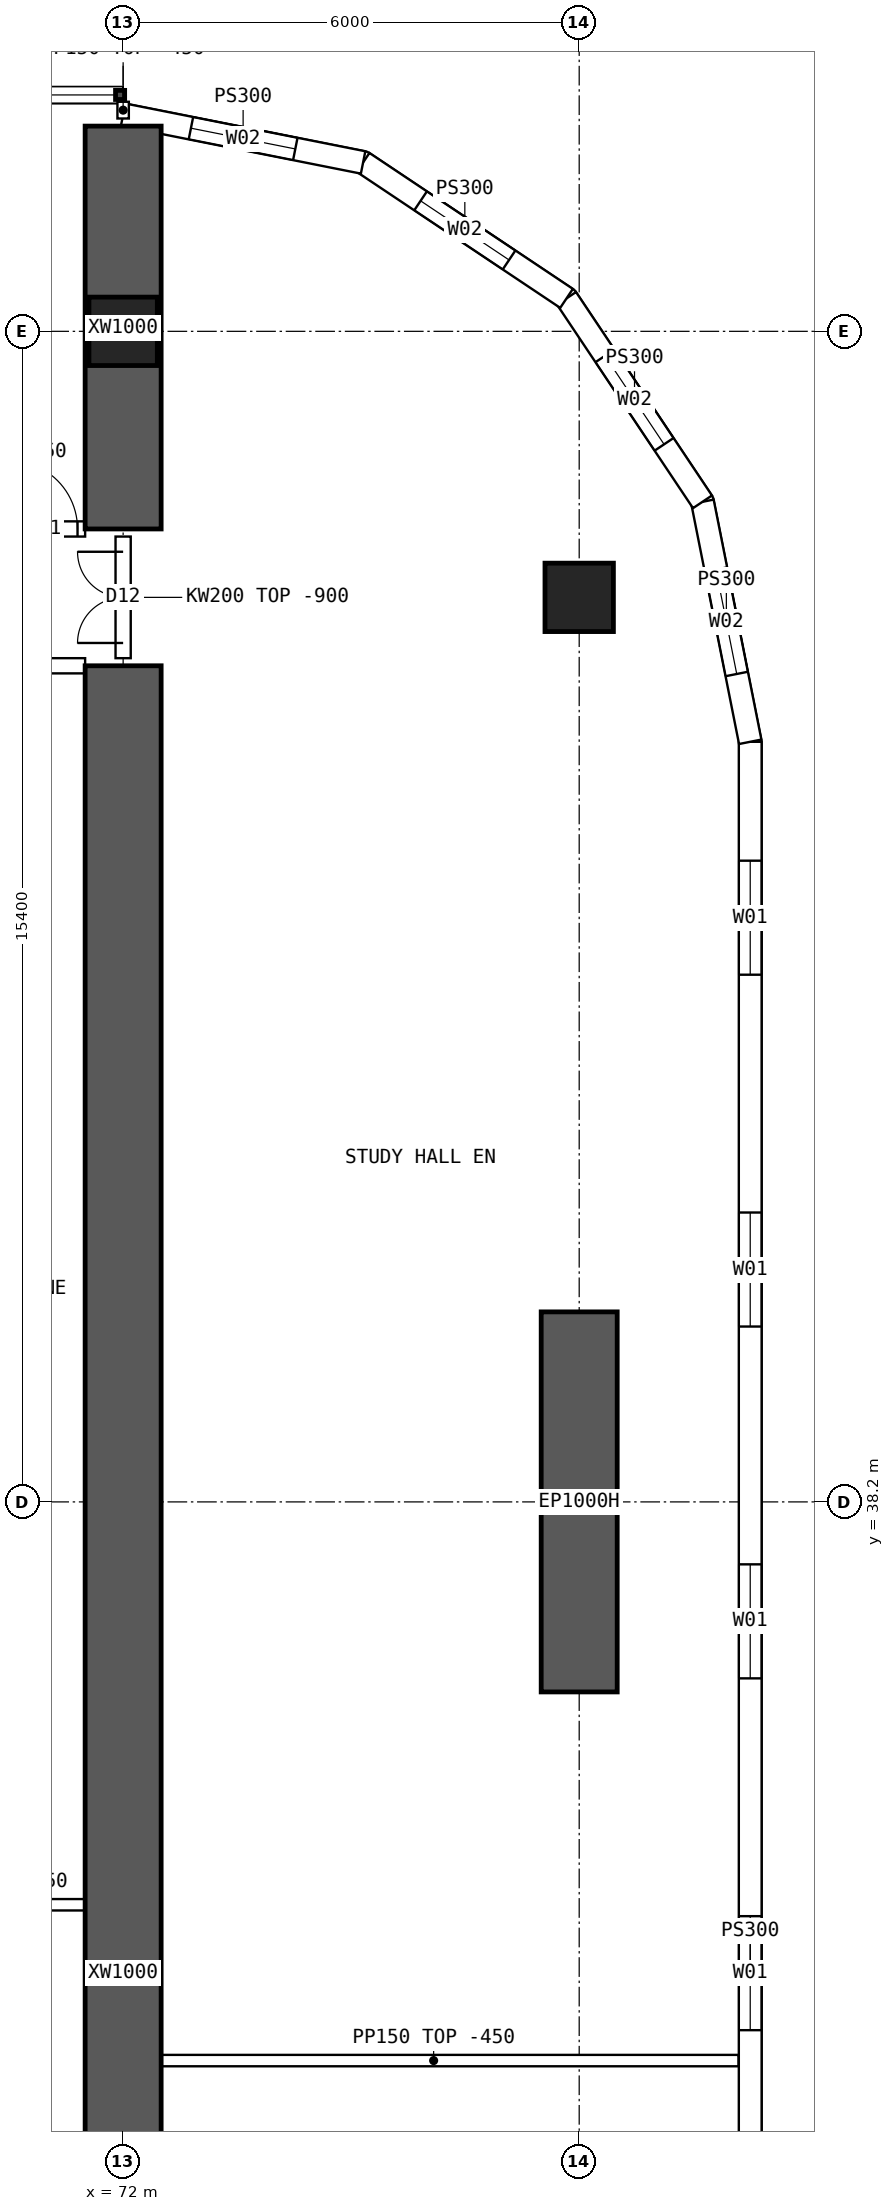
"""IFC4 building model, lengths in metres.
Left out: names, types, materials, properties, quantities, classifications, styles, units other than length and angle.
Written with IfcOpenShell. Run it as: python <this file> out.ifc"""

import sys

from ifc_helpers import new_model, si_unit, direction, frame, frame_2d, origin, origin_2d, place, context, subcontext, project, spatial, polyline, rectangle, hollow_rectangle, outline, extrude, element, fill, save


model = new_model("IFC4")
c1 = context("Model", 3, precision=1e-05, world=origin(), true_north=direction((0.0, 1.0)))
c2 = subcontext(c1, "Body", "Model", "MODEL_VIEW")
j1 = project(units=[si_unit("LENGTHUNIT", "METRE"), si_unit("PLANEANGLEUNIT", "RADIAN")], contexts=[c1])
p1 = place(None, origin())
s1 = spatial("IfcSite", under=j1, at=p1, CompositionType="ELEMENT")
p2 = place(p1, origin())
s2 = spatial("IfcBuilding", under=s1, at=p2, CompositionType="ELEMENT")
p3 = place(p2, frame((0.0, 0.0, 35.2)))
s3 = spatial("IfcBuildingStorey", under=s2, at=p3, CompositionType="ELEMENT", Elevation=35.2)
for number, where, z_axis, x_axis in (
    (1, (72.0, 53.6, 0.0), (0.0, 0.0, 1.0), (1.0, 0.0, 0.0)),
    (2, (78.0, 50.1, 0.0), (0.0, 0.0, 1.0), (1.0, 0.0, 0.0)),
):
    element("IfcColumn", number, at=place(p3, frame(where, z_axis=z_axis, x_axis=x_axis)), inside=s3, PredefinedType="COLUMN", context=c2, shape_type="SweptSolid", body=[
        extrude(hollow_rectangle(XDim=0.9, YDim=0.9, WallThickness=0.09, at=origin_2d()), origin(), (0.0, 0.0, 1.0), 3.75),
    ])
p4 = place(p3, frame((78.0, 35.7, 0.0), z_axis=(0.0, 0.0, 1.0), x_axis=(0.0, 1.0, 0.0)))
e3 = element("IfcWall", 3, at=p4, inside=s3, PredefinedType="SHEAR", context=c2, shape_type="SweptSolid", body=[
    extrude(rectangle(XDim=5.0, YDim=1.0, at=frame_2d((2.5, 0.0))), origin(), (0.0, 0.0, 1.0), 3.75),
])
p5 = place(p3, frame((72.0, 51.0, 0.0), z_axis=(0.0, 0.0, 1.0), x_axis=(0.0, 1.0, 0.0)))
e4 = element("IfcWall", 4, at=p5, inside=s3, PredefinedType="SHEAR", context=c2, shape_type="SweptSolid", body=[
    extrude(rectangle(XDim=5.3, YDim=1.0, at=frame_2d((2.65, 0.0))), origin(), (0.0, 0.0, 1.0), 3.75),
])
p6 = place(p3, frame((72.0, 14.8, 0.0), z_axis=(0.0, 0.0, 1.0), x_axis=(0.0, 1.0, 0.0)))
e5 = element("IfcWall", 5, at=p6, inside=s3, PredefinedType="SHEAR", context=c2, shape_type="SweptSolid", body=[
    extrude(rectangle(XDim=34.4, YDim=1.0, at=frame_2d((17.2, 0.0))), origin(), (0.0, 0.0, 1.0), 3.75),
])
p7 = place(p3, frame((80.25, 15.8, 0.0), z_axis=(0.0, 0.0, 1.0), x_axis=(0.0, 1.0, 0.0)))
e6 = element("IfcWall", 6, at=p7, inside=s3, PredefinedType="SOLIDWALL", context=c2, shape_type="SweptSolid", body=[
    extrude(outline(polyline([(-0.015, -0.15), (32.415, -0.15), (32.385, 0.15), (0.015, 0.15), (-0.015, -0.15)])), origin(), (0.0, 0.0, 1.0), 3.3),
])
p8 = place(p7, frame((1.564, 0.0, 0.9)))
e7 = element("IfcOpeningElement", 7, at=p8, cuts=e6, PredefinedType="OPENING", context=c2, shape_type="SweptSolid", body=[
    extrude(rectangle(XDim=1.5, YDim=2.0, at=frame_2d((0.75, 1.0))), frame((0.0, 0.16, 0.0), z_axis=(0.0, -1.0, 0.0), x_axis=(1.0, 0.0, 0.0)), (0.0, 0.0, 1.0), 0.32),
])
p9 = place(p7, frame((6.193, 0.0, 0.9)))
e8 = element("IfcOpeningElement", 8, at=p9, cuts=e6, PredefinedType="OPENING", context=c2, shape_type="SweptSolid", body=[
    extrude(rectangle(XDim=1.5, YDim=2.0, at=frame_2d((0.75, 1.0))), frame((0.0, 0.16, 0.0), z_axis=(0.0, -1.0, 0.0), x_axis=(1.0, 0.0, 0.0)), (0.0, 0.0, 1.0), 0.32),
])
p10 = place(p7, frame((10.822, 0.0, 0.9)))
e9 = element("IfcOpeningElement", 9, at=p10, cuts=e6, PredefinedType="OPENING", context=c2, shape_type="SweptSolid", body=[
    extrude(rectangle(XDim=1.5, YDim=2.0, at=frame_2d((0.75, 1.0))), frame((0.0, 0.16, 0.0), z_axis=(0.0, -1.0, 0.0), x_axis=(1.0, 0.0, 0.0)), (0.0, 0.0, 1.0), 0.32),
])
p11 = place(p7, frame((15.45, 0.0, 0.9)))
e10 = element("IfcOpeningElement", 10, at=p11, cuts=e6, PredefinedType="OPENING", context=c2, shape_type="SweptSolid", body=[
    extrude(rectangle(XDim=1.5, YDim=2.0, at=frame_2d((0.75, 1.0))), frame((0.0, 0.16, 0.0), z_axis=(0.0, -1.0, 0.0), x_axis=(1.0, 0.0, 0.0)), (0.0, 0.0, 1.0), 0.32),
])
p12 = place(p7, frame((20.079, 0.0, 0.9)))
e11 = element("IfcOpeningElement", 11, at=p12, cuts=e6, PredefinedType="OPENING", context=c2, shape_type="SweptSolid", body=[
    extrude(rectangle(XDim=1.5, YDim=2.0, at=frame_2d((0.75, 1.0))), frame((0.0, 0.16, 0.0), z_axis=(0.0, -1.0, 0.0), x_axis=(1.0, 0.0, 0.0)), (0.0, 0.0, 1.0), 0.32),
])
p13 = place(p7, frame((24.707, 0.0, 0.9)))
e12 = element("IfcOpeningElement", 12, at=p13, cuts=e6, PredefinedType="OPENING", context=c2, shape_type="SweptSolid", body=[
    extrude(rectangle(XDim=1.5, YDim=2.0, at=frame_2d((0.75, 1.0))), frame((0.0, 0.16, 0.0), z_axis=(0.0, -1.0, 0.0), x_axis=(1.0, 0.0, 0.0)), (0.0, 0.0, 1.0), 0.32),
])
p14 = place(p7, frame((29.336, 0.0, 0.9)))
e13 = element("IfcOpeningElement", 13, at=p14, cuts=e6, PredefinedType="OPENING", context=c2, shape_type="SweptSolid", body=[
    extrude(rectangle(XDim=1.5, YDim=2.0, at=frame_2d((0.75, 1.0))), frame((0.0, 0.16, 0.0), z_axis=(0.0, -1.0, 0.0), x_axis=(1.0, 0.0, 0.0)), (0.0, 0.0, 1.0), 0.32),
])
p15 = place(p3, frame((80.25, 48.2, 0.0), z_axis=(0.0, 0.0, 1.0), x_axis=(-0.195065901187, 0.980790137692, 0.0)))
e14 = element("IfcWall", 14, at=p15, inside=s3, PredefinedType="SOLIDWALL", context=c2, shape_type="SweptSolid", body=[
    extrude(outline(polyline([(-0.015, -0.15), (3.249, -0.15), (3.189, 0.15), (0.015, 0.15), (-0.015, -0.15)])), origin(), (0.0, 0.0, 1.0), 3.3),
])
p16 = place(p15, frame((0.909, 0.0, 0.9)))
e15 = element("IfcOpeningElement", 15, at=p16, cuts=e14, PredefinedType="OPENING", context=c2, shape_type="SweptSolid", body=[
    extrude(rectangle(XDim=1.4, YDim=1.8, at=frame_2d((0.7, 0.9))), frame((0.0, 0.16, 0.0), z_axis=(0.0, -1.0, 0.0), x_axis=(1.0, 0.0, 0.0)), (0.0, 0.0, 1.0), 0.32),
])
p17 = place(p3, frame((79.622, 51.357, 0.0), z_axis=(0.0, 0.0, 1.0), x_axis=(-0.555609954424, 0.831443069936, 0.0)))
e16 = element("IfcWall", 16, at=p17, inside=s3, PredefinedType="SOLIDWALL", context=c2, shape_type="SweptSolid", body=[
    extrude(outline(polyline([(-0.03, -0.15), (3.249, -0.15), (3.189, 0.15), (0.03, 0.15), (-0.03, -0.15)])), origin(), (0.0, 0.0, 1.0), 3.3),
])
p18 = place(p17, frame((0.909, 0.0, 0.9)))
e17 = element("IfcOpeningElement", 17, at=p18, cuts=e16, PredefinedType="OPENING", context=c2, shape_type="SweptSolid", body=[
    extrude(rectangle(XDim=1.4, YDim=1.8, at=frame_2d((0.7, 0.9))), frame((0.0, 0.16, 0.0), z_axis=(0.0, -1.0, 0.0), x_axis=(1.0, 0.0, 0.0)), (0.0, 0.0, 1.0), 0.32),
])
p19 = place(p3, frame((77.833, 54.034, 0.0), z_axis=(0.0, 0.0, 1.0), x_axis=(-0.831478105043, 0.555557522525, 0.0)))
e18 = element("IfcWall", 18, at=p19, inside=s3, PredefinedType="SOLIDWALL", context=c2, shape_type="SweptSolid", body=[
    extrude(outline(polyline([(-0.03, -0.15), (3.249, -0.15), (3.189, 0.15), (0.03, 0.15), (-0.03, -0.15)])), origin(), (0.0, 0.0, 1.0), 3.3),
])
p20 = place(p19, frame((0.909, 0.0, 0.9)))
e19 = element("IfcOpeningElement", 19, at=p20, cuts=e18, PredefinedType="OPENING", context=c2, shape_type="SweptSolid", body=[
    extrude(rectangle(XDim=1.4, YDim=1.8, at=frame_2d((0.7, 0.9))), frame((0.0, 0.16, 0.0), z_axis=(0.0, -1.0, 0.0), x_axis=(1.0, 0.0, 0.0)), (0.0, 0.0, 1.0), 0.32),
])
p21 = place(p3, frame((75.157, 55.822, 0.0), z_axis=(0.0, 0.0, 1.0), x_axis=(-0.980787251524, 0.195080412259, 0.0)))
e20 = element("IfcWall", 20, at=p21, inside=s3, PredefinedType="SOLIDWALL", context=c2, shape_type="SweptSolid", body=[
    extrude(outline(polyline([(-0.03, -0.15), (3.249, -0.15), (3.189, 0.15), (0.03, 0.15), (-0.03, -0.15)])), origin(), (0.0, 0.0, 1.0), 3.3),
])
p22 = place(p21, frame((0.909, 0.0, 0.9)))
e21 = element("IfcOpeningElement", 21, at=p22, cuts=e20, PredefinedType="OPENING", context=c2, shape_type="SweptSolid", body=[
    extrude(rectangle(XDim=1.4, YDim=1.8, at=frame_2d((0.7, 0.9))), frame((0.0, 0.16, 0.0), z_axis=(0.0, -1.0, 0.0), x_axis=(1.0, 0.0, 0.0)), (0.0, 0.0, 1.0), 0.32),
])
p23 = place(p3, frame((66.5, 51.0, 0.0), z_axis=(0.0, 0.0, 1.0), x_axis=(1.0, 0.0, 0.0)))
e22 = element("IfcWall", 22, at=p23, inside=s3, PredefinedType="SOLIDWALL", context=c2, shape_type="SweptSolid", body=[
    extrude(outline(polyline([(0.0, 0.0), (5.0, 0.0), (5.0, 2.9), (0.0, 2.9), (0.0, 0.0)])), frame((0.0, 0.1, 0.0), z_axis=(0.0, -1.0, 0.0), x_axis=(1.0, 0.0, 0.0)), (0.0, 0.0, 1.0), 0.2),
])
p24 = place(p23, frame((0.1, 0.0, 0.0)))
e23 = element("IfcOpeningElement", 23, at=p24, cuts=e22, PredefinedType="OPENING", context=c2, shape_type="SweptSolid", body=[
    extrude(rectangle(XDim=0.9, YDim=2.1, at=frame_2d((0.45, 1.05))), frame((0.0, 0.11, 0.0), z_axis=(0.0, -1.0, 0.0), x_axis=(1.0, 0.0, 0.0)), (0.0, 0.0, 1.0), 0.22),
])
p25 = place(p23, frame((4.0, 0.0, 0.0)))
e24 = element("IfcOpeningElement", 24, at=p25, cuts=e22, PredefinedType="OPENING", context=c2, shape_type="SweptSolid", body=[
    extrude(rectangle(XDim=0.9, YDim=2.1, at=frame_2d((0.45, 1.05))), frame((0.0, 0.11, 0.0), z_axis=(0.0, -1.0, 0.0), x_axis=(1.0, 0.0, 0.0)), (0.0, 0.0, 1.0), 0.22),
])
p26 = place(p3, frame((66.5, 49.2, 0.0), z_axis=(0.0, 0.0, 1.0), x_axis=(1.0, 0.0, 0.0)))
e25 = element("IfcWall", 25, at=p26, inside=s3, PredefinedType="SOLIDWALL", context=c2, shape_type="SweptSolid", body=[
    extrude(rectangle(XDim=5.0, YDim=0.2, at=frame_2d((2.5, 0.0))), origin(), (0.0, 0.0, 1.0), 3.3),
])
p27 = place(p26, frame((0.2, 0.0, 0.0)))
e26 = element("IfcOpeningElement", 26, at=p27, cuts=e25, PredefinedType="OPENING", context=c2, shape_type="SweptSolid", body=[
    extrude(rectangle(XDim=1.6, YDim=2.1, at=frame_2d((0.8, 1.05))), frame((0.0, 0.11, 0.0), z_axis=(0.0, -1.0, 0.0), x_axis=(1.0, 0.0, 0.0)), (0.0, 0.0, 1.0), 0.22),
])
p28 = place(p3, frame((68.4, 32.9, 0.0), z_axis=(0.0, 0.0, 1.0), x_axis=(1.0, 0.0, 0.0)))
e27 = element("IfcWall", 27, at=p28, inside=s3, PredefinedType="PARTITIONING", context=c2, shape_type="SweptSolid", body=[
    extrude(rectangle(XDim=3.6, YDim=0.15, at=frame_2d((1.8, 0.0))), origin(), (0.0, 0.0, 1.0), 3.3),
])
p29 = place(p3, frame((72.075, 30.85, 0.0), z_axis=(0.0, 0.0, 1.0), x_axis=(1.0, 0.0, 0.0)))
e28 = element("IfcWall", 28, at=p29, inside=s3, PredefinedType="PARTITIONING", context=c2, shape_type="SweptSolid", body=[
    extrude(outline(polyline([(0.0, 0.0), (8.02, 0.0), (8.02, 3.3), (6.227, 3.3), (6.225, 2.85), (5.627, 2.85), (5.625, 3.3), (0.0, 3.3), (0.0, 0.0)])), frame((0.0, 0.075, 0.0), z_axis=(0.0, -1.0, 0.0), x_axis=(1.0, 0.0, 0.0)), (0.0, 0.0, 1.0), 0.15),
])
p30 = place(p3, frame((72.0, 49.3, 0.0), z_axis=(0.0, 0.0, 1.0), x_axis=(0.0, 1.0, 0.0)))
e29 = element("IfcWall", 29, at=p30, inside=s3, PredefinedType="SOLIDWALL", context=c2, shape_type="SweptSolid", body=[
    extrude(outline(polyline([(0.0, 0.0), (1.6, 0.0), (1.6, 2.85), (0.0, 2.85), (0.0, 0.0)])), frame((0.0, 0.1, 0.0), z_axis=(0.0, -1.0, 0.0), x_axis=(1.0, 0.0, 0.0)), (0.0, 0.0, 1.0), 0.2),
])
p31 = place(p30, frame((0.2, 0.0, 0.0)))
e30 = element("IfcOpeningElement", 30, at=p31, cuts=e29, PredefinedType="OPENING", context=c2, shape_type="SweptSolid", body=[
    extrude(rectangle(XDim=1.2, YDim=2.1, at=frame_2d((0.6, 1.05))), frame((0.0, 0.11, 0.0), z_axis=(0.0, -1.0, 0.0), x_axis=(1.0, 0.0, 0.0)), (0.0, 0.0, 1.0), 0.22),
])
p32 = place(p3, frame((72.0, 56.4, 0.0), z_axis=(0.0, 0.0, 1.0), x_axis=(0.0, 1.0, 0.0)))
e31 = element("IfcWall", 31, at=p32, inside=s3, PredefinedType="PARTITIONING", context=c2, shape_type="SweptSolid", body=[
    extrude(rectangle(XDim=0.22, YDim=0.15, at=frame_2d((0.11, 0.0))), origin(), (0.0, 0.0, 1.0), 3.3),
])
p33 = place(p11, origin())
e32 = element("IfcWindow", 32, at=p33, inside=s3, PartitioningType="SINGLE_PANEL", PredefinedType="WINDOW", context=c2, shape_type="SweptSolid", body=[
    extrude(rectangle(XDim=1.5, YDim=2.0, at=frame_2d((0.75, 1.0))), frame((0.0, 0.03, 0.0), z_axis=(0.0, -1.0, 0.0), x_axis=(1.0, 0.0, 0.0)), (0.0, 0.0, 1.0), 0.06),
])
fill(e10, e32)
p34 = place(p12, origin())
e33 = element("IfcWindow", 33, at=p34, inside=s3, PartitioningType="SINGLE_PANEL", PredefinedType="WINDOW", context=c2, shape_type="SweptSolid", body=[
    extrude(rectangle(XDim=1.5, YDim=2.0, at=frame_2d((0.75, 1.0))), frame((0.0, 0.03, 0.0), z_axis=(0.0, -1.0, 0.0), x_axis=(1.0, 0.0, 0.0)), (0.0, 0.0, 1.0), 0.06),
])
fill(e11, e33)
p35 = place(p13, origin())
e34 = element("IfcWindow", 34, at=p35, inside=s3, PartitioningType="SINGLE_PANEL", PredefinedType="WINDOW", context=c2, shape_type="SweptSolid", body=[
    extrude(rectangle(XDim=1.5, YDim=2.0, at=frame_2d((0.75, 1.0))), frame((0.0, 0.03, 0.0), z_axis=(0.0, -1.0, 0.0), x_axis=(1.0, 0.0, 0.0)), (0.0, 0.0, 1.0), 0.06),
])
fill(e12, e34)
p36 = place(p14, origin())
e35 = element("IfcWindow", 35, at=p36, inside=s3, PartitioningType="SINGLE_PANEL", PredefinedType="WINDOW", context=c2, shape_type="SweptSolid", body=[
    extrude(rectangle(XDim=1.5, YDim=2.0, at=frame_2d((0.75, 1.0))), frame((0.0, 0.03, 0.0), z_axis=(0.0, -1.0, 0.0), x_axis=(1.0, 0.0, 0.0)), (0.0, 0.0, 1.0), 0.06),
])
fill(e13, e35)
p37 = place(p16, origin())
e36 = element("IfcWindow", 36, at=p37, inside=s3, PartitioningType="SINGLE_PANEL", PredefinedType="WINDOW", context=c2, shape_type="SweptSolid", body=[
    extrude(rectangle(XDim=1.4, YDim=1.8, at=frame_2d((0.7, 0.9))), frame((0.0, 0.03, 0.0), z_axis=(0.0, -1.0, 0.0), x_axis=(1.0, 0.0, 0.0)), (0.0, 0.0, 1.0), 0.06),
])
fill(e15, e36)
p38 = place(p18, origin())
e37 = element("IfcWindow", 37, at=p38, inside=s3, PartitioningType="SINGLE_PANEL", PredefinedType="WINDOW", context=c2, shape_type="SweptSolid", body=[
    extrude(rectangle(XDim=1.4, YDim=1.8, at=frame_2d((0.7, 0.9))), frame((0.0, 0.03, 0.0), z_axis=(0.0, -1.0, 0.0), x_axis=(1.0, 0.0, 0.0)), (0.0, 0.0, 1.0), 0.06),
])
fill(e17, e37)
p39 = place(p20, origin())
e38 = element("IfcWindow", 38, at=p39, inside=s3, PartitioningType="SINGLE_PANEL", PredefinedType="WINDOW", context=c2, shape_type="SweptSolid", body=[
    extrude(rectangle(XDim=1.4, YDim=1.8, at=frame_2d((0.7, 0.9))), frame((0.0, 0.03, 0.0), z_axis=(0.0, -1.0, 0.0), x_axis=(1.0, 0.0, 0.0)), (0.0, 0.0, 1.0), 0.06),
])
fill(e19, e38)
p40 = place(p22, origin())
e39 = element("IfcWindow", 39, at=p40, inside=s3, PartitioningType="SINGLE_PANEL", PredefinedType="WINDOW", context=c2, shape_type="SweptSolid", body=[
    extrude(rectangle(XDim=1.4, YDim=1.8, at=frame_2d((0.7, 0.9))), frame((0.0, 0.03, 0.0), z_axis=(0.0, -1.0, 0.0), x_axis=(1.0, 0.0, 0.0)), (0.0, 0.0, 1.0), 0.06),
])
fill(e21, e39)
p41 = place(p25, origin())
e40 = element("IfcDoor", 40, at=p41, inside=s3, OperationType="SINGLE_SWING_LEFT", PredefinedType="DOOR", context=c2, shape_type="SweptSolid", body=[
    extrude(rectangle(XDim=0.9, YDim=2.1, at=frame_2d((0.45, 1.05))), frame((0.0, 0.025, 0.0), z_axis=(0.0, -1.0, 0.0), x_axis=(1.0, 0.0, 0.0)), (0.0, 0.0, 1.0), 0.05),
])
fill(e24, e40)
p42 = place(p31, origin())
e41 = element("IfcDoor", 41, at=p42, inside=s3, OperationType="DOUBLE_DOOR_SINGLE_SWING", PredefinedType="DOOR", context=c2, shape_type="SweptSolid", body=[
    extrude(rectangle(XDim=1.2, YDim=2.1, at=frame_2d((0.6, 1.05))), frame((0.0, 0.025, 0.0), z_axis=(0.0, -1.0, 0.0), x_axis=(1.0, 0.0, 0.0)), (0.0, 0.0, 1.0), 0.05),
])
fill(e30, e41)
save(model, sys.argv[1])
